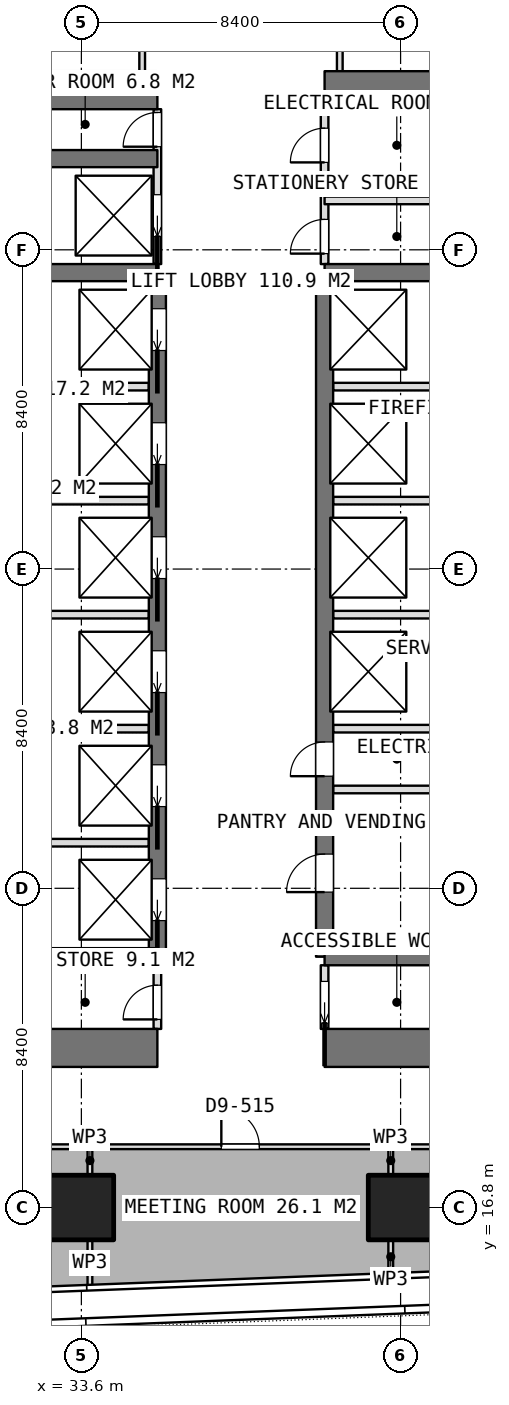
"""IFC4 building model, lengths in metres.
Left out: names, types, materials, properties, quantities, classifications, styles, units other than length and angle.
Written with IfcOpenShell. Run it as: python <this file> out.ifc"""

import sys

from ifc_helpers import new_model, si_unit, direction, frame, frame_2d, origin, origin_2d, place, context, subcontext, project, spatial, rectangle, extrude, element, fill, save


model = new_model("IFC4")
c1 = context("Model", 3, precision=1e-05, world=origin(), true_north=direction((0.0, 1.0)))
c2 = subcontext(c1, "Body", "Model", "MODEL_VIEW")
j1 = project(units=[si_unit("LENGTHUNIT", "METRE"), si_unit("PLANEANGLEUNIT", "RADIAN")], contexts=[c1])
p1 = place(None, origin())
s1 = spatial("IfcSite", under=j1, at=p1, CompositionType="ELEMENT")
p2 = place(p1, origin())
s2 = spatial("IfcBuilding", under=s1, at=p2, CompositionType="ELEMENT")
p3 = place(p2, frame((0.0, 0.0, 132.8)))
s3 = spatial("IfcBuildingStorey", under=s2, at=p3, CompositionType="ELEMENT", Elevation=132.8)
p4 = place(p3, frame((25.2, 21.0, 0.0), z_axis=(0.0, 0.0, 1.0), x_axis=(1.0, 0.0, 0.0)))
e1 = element("IfcWall", 1, at=p4, inside=s3, PredefinedType="SHEAR", context=c2, shape_type="SweptSolid", body=[
    extrude(rectangle(XDim=10.4, YDim=1.0, at=frame_2d((5.2, 0.0))), origin(), (0.0, 0.0, 1.0), 3.75),
])
p5 = place(p3, frame((40.0, 21.0, 0.0), z_axis=(0.0, 0.0, 1.0), x_axis=(1.0, 0.0, 0.0)))
e2 = element("IfcWall", 2, at=p5, inside=s3, PredefinedType="SHEAR", context=c2, shape_type="SweptSolid", body=[
    extrude(rectangle(XDim=10.4, YDim=1.0, at=frame_2d((5.2, 0.0))), origin(), (0.0, 0.0, 1.0), 3.75),
])
p6 = place(p3, frame((25.2, 46.2, 0.0), z_axis=(0.0, 0.0, 1.0), x_axis=(1.0, 0.0, 0.0)))
e3 = element("IfcWall", 3, at=p6, inside=s3, PredefinedType="SHEAR", context=c2, shape_type="SweptSolid", body=[
    extrude(rectangle(XDim=10.4, YDim=1.0, at=frame_2d((5.2, 0.0))), origin(), (0.0, 0.0, 1.0), 3.75),
])
p7 = place(p3, frame((40.0, 46.2, 0.0), z_axis=(0.0, 0.0, 1.0), x_axis=(1.0, 0.0, 0.0)))
e4 = element("IfcWall", 4, at=p7, inside=s3, PredefinedType="SHEAR", context=c2, shape_type="SweptSolid", body=[
    extrude(rectangle(XDim=10.4, YDim=1.0, at=frame_2d((5.2, 0.0))), origin(), (0.0, 0.0, 1.0), 3.75),
])
p8 = place(p3, frame((35.6, 23.4, 0.0), z_axis=(0.0, 0.0, 1.0), x_axis=(0.0, 1.0, 0.0)))
e5 = element("IfcWall", 5, at=p8, inside=s3, PredefinedType="SHEAR", context=c2, shape_type="SweptSolid", body=[
    extrude(rectangle(XDim=18.0, YDim=0.45, at=frame_2d((9.0, 0.0))), origin(), (0.0, 0.0, 1.0), 3.75),
])
p9 = place(p8, frame((0.95, 0.0, 0.0)))
e6 = element("IfcOpeningElement", 6, at=p9, cuts=e5, PredefinedType="OPENING", context=c2, shape_type="SweptSolid", body=[
    extrude(rectangle(XDim=1.1, YDim=2.1, at=frame_2d((0.55, 1.05))), frame((0.0, 0.235, 0.0), z_axis=(0.0, -1.0, 0.0), x_axis=(1.0, 0.0, 0.0)), (0.0, 0.0, 1.0), 0.47),
])
p10 = place(p8, frame((3.95, 0.0, 0.0)))
e7 = element("IfcOpeningElement", 7, at=p10, cuts=e5, PredefinedType="OPENING", context=c2, shape_type="SweptSolid", body=[
    extrude(rectangle(XDim=1.1, YDim=2.1, at=frame_2d((0.55, 1.05))), frame((0.0, 0.235, 0.0), z_axis=(0.0, -1.0, 0.0), x_axis=(1.0, 0.0, 0.0)), (0.0, 0.0, 1.0), 0.47),
])
p11 = place(p8, frame((6.95, 0.0, 0.0)))
e8 = element("IfcOpeningElement", 8, at=p11, cuts=e5, PredefinedType="OPENING", context=c2, shape_type="SweptSolid", body=[
    extrude(rectangle(XDim=1.1, YDim=2.1, at=frame_2d((0.55, 1.05))), frame((0.0, 0.235, 0.0), z_axis=(0.0, -1.0, 0.0), x_axis=(1.0, 0.0, 0.0)), (0.0, 0.0, 1.0), 0.47),
])
p12 = place(p8, frame((9.95, 0.0, 0.0)))
e9 = element("IfcOpeningElement", 9, at=p12, cuts=e5, PredefinedType="OPENING", context=c2, shape_type="SweptSolid", body=[
    extrude(rectangle(XDim=1.1, YDim=2.1, at=frame_2d((0.55, 1.05))), frame((0.0, 0.235, 0.0), z_axis=(0.0, -1.0, 0.0), x_axis=(1.0, 0.0, 0.0)), (0.0, 0.0, 1.0), 0.47),
])
p13 = place(p8, frame((12.95, 0.0, 0.0)))
e10 = element("IfcOpeningElement", 10, at=p13, cuts=e5, PredefinedType="OPENING", context=c2, shape_type="SweptSolid", body=[
    extrude(rectangle(XDim=1.1, YDim=2.1, at=frame_2d((0.55, 1.05))), frame((0.0, 0.235, 0.0), z_axis=(0.0, -1.0, 0.0), x_axis=(1.0, 0.0, 0.0)), (0.0, 0.0, 1.0), 0.47),
])
p14 = place(p8, frame((15.95, 0.0, 0.0)))
e11 = element("IfcOpeningElement", 11, at=p14, cuts=e5, PredefinedType="OPENING", context=c2, shape_type="SweptSolid", body=[
    extrude(rectangle(XDim=1.1, YDim=2.1, at=frame_2d((0.55, 1.05))), frame((0.0, 0.235, 0.0), z_axis=(0.0, -1.0, 0.0), x_axis=(1.0, 0.0, 0.0)), (0.0, 0.0, 1.0), 0.47),
])
p15 = place(p3, frame((40.0, 23.4, 0.0), z_axis=(0.0, 0.0, 1.0), x_axis=(0.0, 1.0, 0.0)))
e12 = element("IfcWall", 12, at=p15, inside=s3, PredefinedType="SHEAR", context=c2, shape_type="SweptSolid", body=[
    extrude(rectangle(XDim=18.0, YDim=0.45, at=frame_2d((9.0, 0.0))), origin(), (0.0, 0.0, 1.0), 3.75),
])
p16 = place(p15, frame((1.7, 0.0, 0.0)))
e13 = element("IfcOpeningElement", 13, at=p16, cuts=e12, PredefinedType="OPENING", context=c2, shape_type="SweptSolid", body=[
    extrude(rectangle(XDim=1.0, YDim=2.1, at=frame_2d((0.5, 1.05))), frame((0.0, 0.235, 0.0), z_axis=(0.0, -1.0, 0.0), x_axis=(1.0, 0.0, 0.0)), (0.0, 0.0, 1.0), 0.47),
])
p17 = place(p15, frame((4.75, 0.0, 0.0)))
e14 = element("IfcOpeningElement", 14, at=p17, cuts=e12, PredefinedType="OPENING", context=c2, shape_type="SweptSolid", body=[
    extrude(rectangle(XDim=0.9, YDim=2.1, at=frame_2d((0.45, 1.05))), frame((0.0, 0.235, 0.0), z_axis=(0.0, -1.0, 0.0), x_axis=(1.0, 0.0, 0.0)), (0.0, 0.0, 1.0), 0.47),
])
for number, where, z_axis, x_axis in (
    (15, (31.8, 23.4, 0.0), (0.0, 0.0, 1.0), (1.0, 0.0, 0.0)),
    (16, (31.8, 41.4, 0.0), (0.0, 0.0, 1.0), (1.0, 0.0, 0.0)),
    (17, (31.8, 44.4, 0.0), (0.0, 0.0, 1.0), (1.0, 0.0, 0.0)),
    (18, (40.0, 23.4, 0.0), (0.0, 0.0, 1.0), (1.0, 0.0, 0.0)),
    (19, (40.0, 41.4, 0.0), (0.0, 0.0, 1.0), (1.0, 0.0, 0.0)),
):
    element("IfcWall", number, at=place(p3, frame(where, z_axis=z_axis, x_axis=x_axis)), inside=s3, PredefinedType="SHEAR", context=c2, shape_type="SweptSolid", body=[
        extrude(rectangle(XDim=3.8, YDim=0.45, at=frame_2d((1.9, 0.0))), origin(), (0.0, 0.0, 1.0), 3.75),
    ])
for number, where, z_axis, x_axis in (
    (20, (33.6, 16.8, 0.0), (0.0, 0.0, 1.0), (1.0, 0.0, 0.0)),
    (21, (42.0, 16.8, 0.0), (0.0, 0.0, 1.0), (1.0, 0.0, 0.0)),
):
    element("IfcColumn", number, at=place(p3, frame(where, z_axis=z_axis, x_axis=x_axis)), inside=s3, PredefinedType="COLUMN", context=c2, shape_type="SweptSolid", body=[
        extrude(rectangle(XDim=1.7, YDim=1.7, at=origin_2d()), origin(), (0.0, 0.0, 1.0), 3.75),
    ])
for number, where, z_axis, x_axis in (
    (22, (32.025, 26.4, 0.0), (0.0, 0.0, 1.0), (1.0, 0.0, 0.0)),
    (23, (32.025, 29.4, 0.0), (0.0, 0.0, 1.0), (1.0, 0.0, 0.0)),
    (24, (32.025, 32.4, 0.0), (0.0, 0.0, 1.0), (1.0, 0.0, 0.0)),
    (25, (32.025, 35.4, 0.0), (0.0, 0.0, 1.0), (1.0, 0.0, 0.0)),
    (26, (32.025, 38.4, 0.0), (0.0, 0.0, 1.0), (1.0, 0.0, 0.0)),
):
    element("IfcWall", number, at=place(p3, frame(where, z_axis=z_axis, x_axis=x_axis)), inside=s3, PredefinedType="PARTITIONING", context=c2, shape_type="SweptSolid", body=[
        extrude(rectangle(XDim=3.35, YDim=0.2, at=frame_2d((1.675, 0.0))), origin(), (0.0, 0.0, 1.0), 3.5),
    ])
for number, where, z_axis, x_axis in (
    (27, (40.225, 29.4, 0.0), (0.0, 0.0, 1.0), (1.0, 0.0, 0.0)),
    (28, (40.225, 32.4, 0.0), (0.0, 0.0, 1.0), (1.0, 0.0, 0.0)),
    (29, (40.225, 35.4, 0.0), (0.0, 0.0, 1.0), (1.0, 0.0, 0.0)),
    (30, (40.225, 38.4, 0.0), (0.0, 0.0, 1.0), (1.0, 0.0, 0.0)),
):
    element("IfcWall", number, at=place(p3, frame(where, z_axis=z_axis, x_axis=x_axis)), inside=s3, PredefinedType="PARTITIONING", context=c2, shape_type="SweptSolid", body=[
        extrude(rectangle(XDim=3.35, YDim=0.2, at=frame_2d((1.675, 0.0))), origin(), (0.0, 0.0, 1.0), 3.5),
    ])
p18 = place(p3, frame((40.0, 21.5, 0.0), z_axis=(0.0, 0.0, 1.0), x_axis=(0.0, 1.0, 0.0)))
e31 = element("IfcWall", 31, at=p18, inside=s3, PredefinedType="PARTITIONING", context=c2, shape_type="SweptSolid", body=[
    extrude(rectangle(XDim=1.675, YDim=0.2, at=frame_2d((0.837, 0.0))), origin(), (0.0, 0.0, 1.0), 3.5),
])
p19 = place(p18, frame((0.15, 0.0, 0.0)))
e32 = element("IfcOpeningElement", 32, at=p19, cuts=e31, PredefinedType="OPENING", context=c2, shape_type="SweptSolid", body=[
    extrude(rectangle(XDim=1.1, YDim=2.1, at=frame_2d((0.55, 1.05))), frame((0.0, 0.11, 0.0), z_axis=(0.0, -1.0, 0.0), x_axis=(1.0, 0.0, 0.0)), (0.0, 0.0, 1.0), 0.22),
])
p20 = place(p3, frame((40.0, 41.625, 0.0), z_axis=(0.0, 0.0, 1.0), x_axis=(0.0, 1.0, 0.0)))
e33 = element("IfcWall", 33, at=p20, inside=s3, PredefinedType="PARTITIONING", context=c2, shape_type="SweptSolid", body=[
    extrude(rectangle(XDim=4.075, YDim=0.2, at=frame_2d((2.038, 0.0))), origin(), (0.0, 0.0, 1.0), 3.5),
])
p21 = place(p20, frame((2.675, 0.0, 0.0)))
e34 = element("IfcOpeningElement", 34, at=p21, cuts=e33, PredefinedType="OPENING", context=c2, shape_type="SweptSolid", body=[
    extrude(rectangle(XDim=0.9, YDim=2.1, at=frame_2d((0.45, 1.05))), frame((0.0, 0.11, 0.0), z_axis=(0.0, -1.0, 0.0), x_axis=(1.0, 0.0, 0.0)), (0.0, 0.0, 1.0), 0.22),
])
p22 = place(p20, frame((0.275, 0.0, 0.0)))
e35 = element("IfcOpeningElement", 35, at=p22, cuts=e33, PredefinedType="OPENING", context=c2, shape_type="SweptSolid", body=[
    extrude(rectangle(XDim=0.9, YDim=2.1, at=frame_2d((0.45, 1.05))), frame((0.0, 0.11, 0.0), z_axis=(0.0, -1.0, 0.0), x_axis=(1.0, 0.0, 0.0)), (0.0, 0.0, 1.0), 0.22),
])
p23 = place(p3, frame((35.6, 41.625, 0.0), z_axis=(0.0, 0.0, 1.0), x_axis=(0.0, 1.0, 0.0)))
e36 = element("IfcWall", 36, at=p23, inside=s3, PredefinedType="PARTITIONING", context=c2, shape_type="SweptSolid", body=[
    extrude(rectangle(XDim=4.075, YDim=0.2, at=frame_2d((2.038, 0.0))), origin(), (0.0, 0.0, 1.0), 3.5),
])
p24 = place(p23, frame((3.088, 0.0, 0.0)))
e37 = element("IfcOpeningElement", 37, at=p24, cuts=e36, PredefinedType="OPENING", context=c2, shape_type="SweptSolid", body=[
    extrude(rectangle(XDim=0.9, YDim=2.1, at=frame_2d((0.45, 1.05))), frame((0.0, 0.11, 0.0), z_axis=(0.0, -1.0, 0.0), x_axis=(1.0, 0.0, 0.0)), (0.0, 0.0, 1.0), 0.22),
])
p25 = place(p23, frame((0.725, 0.0, 0.0)))
e38 = element("IfcOpeningElement", 38, at=p25, cuts=e36, PredefinedType="OPENING", context=c2, shape_type="SweptSolid", body=[
    extrude(rectangle(XDim=1.1, YDim=2.1, at=frame_2d((0.55, 1.05))), frame((0.0, 0.11, 0.0), z_axis=(0.0, -1.0, 0.0), x_axis=(1.0, 0.0, 0.0)), (0.0, 0.0, 1.0), 0.22),
])
p26 = place(p3, frame((35.6, 21.5, 0.0), z_axis=(0.0, 0.0, 1.0), x_axis=(0.0, 1.0, 0.0)))
e39 = element("IfcWall", 39, at=p26, inside=s3, PredefinedType="PARTITIONING", context=c2, shape_type="SweptSolid", body=[
    extrude(rectangle(XDim=1.675, YDim=0.2, at=frame_2d((0.837, 0.0))), origin(), (0.0, 0.0, 1.0), 3.5),
])
p27 = place(p26, frame((0.25, 0.0, 0.0)))
e40 = element("IfcOpeningElement", 40, at=p27, cuts=e39, PredefinedType="OPENING", context=c2, shape_type="SweptSolid", body=[
    extrude(rectangle(XDim=0.9, YDim=2.1, at=frame_2d((0.45, 1.05))), frame((0.0, 0.11, 0.0), z_axis=(0.0, -1.0, 0.0), x_axis=(1.0, 0.0, 0.0)), (0.0, 0.0, 1.0), 0.22),
])
p28 = place(p3, frame((40.225, 27.8, 0.0), z_axis=(0.0, 0.0, 1.0), x_axis=(1.0, 0.0, 0.0)))
e41 = element("IfcWall", 41, at=p28, inside=s3, PredefinedType="PARTITIONING", context=c2, shape_type="SweptSolid", body=[
    extrude(rectangle(XDim=3.35, YDim=0.2, at=frame_2d((1.675, 0.0))), origin(), (0.0, 0.0, 1.0), 3.5),
])
p29 = place(p3, frame((40.0, 43.3, 0.0), z_axis=(0.0, 0.0, 1.0), x_axis=(1.0, 0.0, 0.0)))
e42 = element("IfcWall", 42, at=p29, inside=s3, PredefinedType="PARTITIONING", context=c2, shape_type="SweptSolid", body=[
    extrude(rectangle(XDim=3.575, YDim=0.2, at=frame_2d((1.788, 0.0))), origin(), (0.0, 0.0, 1.0), 3.5),
])
for number, where, z_axis, x_axis in (
    (43, (40.4, 46.7, 0.0), (0.0, 0.0, 1.0), (0.0, 1.0, 0.0)),
    (44, (35.2, 46.7, 0.0), (0.0, 0.0, 1.0), (0.0, 1.0, 0.0)),
):
    element("IfcWall", number, at=place(p3, frame(where, z_axis=z_axis, x_axis=x_axis)), inside=s3, PredefinedType="PARTITIONING", context=c2, shape_type="SweptSolid", body=[
        extrude(rectangle(XDim=2.625, YDim=0.15, at=frame_2d((1.312, 0.0))), origin(), (0.0, 0.0, 1.0), 3.5),
    ])
p30 = place(p3, frame((41.741, 18.4, 0.0), z_axis=(0.0, 0.0, 1.0), x_axis=(1.0, 0.0, 0.0)))
e45 = element("IfcWall", 45, at=p30, inside=s3, PredefinedType="PARTITIONING", context=c2, shape_type="SweptSolid", body=[
    extrude(rectangle(XDim=8.195, YDim=0.125, at=frame_2d((4.098, 0.0))), origin(), (0.0, 0.0, 1.0), 3.5),
])
p31 = place(p30, frame((3.597, 0.0, 0.0)))
e46 = element("IfcOpeningElement", 46, at=p31, cuts=e45, PredefinedType="OPENING", context=c2, shape_type="SweptSolid", body=[
    extrude(rectangle(XDim=1.0, YDim=2.1, at=frame_2d((0.5, 1.05))), frame((0.0, 0.073, 0.0), z_axis=(0.0, -1.0, 0.0), x_axis=(1.0, 0.0, 0.0)), (0.0, 0.0, 1.0), 0.145),
])
p32 = place(p3, frame((41.741, 15.08, 0.0), z_axis=(0.0, 0.0, 1.0), x_axis=(0.0, 1.0, 0.0)))
e47 = element("IfcWall", 47, at=p32, inside=s3, PredefinedType="PARTITIONING", context=c2, shape_type="SweptSolid", body=[
    extrude(rectangle(XDim=0.85, YDim=0.125, at=frame_2d((0.425, 0.0))), origin(), (0.0, 0.0, 1.0), 3.5),
])
p33 = place(p3, frame((41.741, 17.67, 0.0), z_axis=(0.0, 0.0, 1.0), x_axis=(0.0, 1.0, 0.0)))
e48 = element("IfcWall", 48, at=p33, inside=s3, PredefinedType="PARTITIONING", context=c2, shape_type="SweptSolid", body=[
    extrude(rectangle(XDim=0.73, YDim=0.125, at=frame_2d((0.365, 0.0))), origin(), (0.0, 0.0, 1.0), 3.5),
])
p34 = place(p3, frame((25.38, 18.4, 0.0), z_axis=(0.0, 0.0, 1.0), x_axis=(1.0, 0.0, 0.0)))
e49 = element("IfcWall", 49, at=p34, inside=s3, PredefinedType="PARTITIONING", context=c2, shape_type="SweptSolid", body=[
    extrude(rectangle(XDim=8.445, YDim=0.125, at=frame_2d((4.223, 0.0))), origin(), (0.0, 0.0, 1.0), 3.5),
])
p35 = place(p34, frame((3.723, 0.0, 0.0)))
e50 = element("IfcOpeningElement", 50, at=p35, cuts=e49, PredefinedType="OPENING", context=c2, shape_type="SweptSolid", body=[
    extrude(rectangle(XDim=1.0, YDim=2.1, at=frame_2d((0.5, 1.05))), frame((0.0, 0.073, 0.0), z_axis=(0.0, -1.0, 0.0), x_axis=(1.0, 0.0, 0.0)), (0.0, 0.0, 1.0), 0.145),
])
p36 = place(p3, frame((33.825, 18.4, 0.0), z_axis=(0.0, 0.0, 1.0), x_axis=(0.0, -1.0, 0.0)))
e51 = element("IfcWall", 51, at=p36, inside=s3, PredefinedType="PARTITIONING", context=c2, shape_type="SweptSolid", body=[
    extrude(rectangle(XDim=0.73, YDim=0.125, at=frame_2d((0.365, 0.0))), origin(), (0.0, 0.0, 1.0), 3.5),
])
p37 = place(p3, frame((33.825, 15.93, 0.0), z_axis=(0.0, 0.0, 1.0), x_axis=(0.0, -1.0, 0.0)))
e52 = element("IfcWall", 52, at=p37, inside=s3, PredefinedType="PARTITIONING", context=c2, shape_type="SweptSolid", body=[
    extrude(rectangle(XDim=1.188, YDim=0.125, at=frame_2d((0.594, 0.0))), origin(), (0.0, 0.0, 1.0), 3.5),
])
p38 = place(p3, frame((33.826, 18.4, 0.0), z_axis=(0.0, 0.0, 1.0), x_axis=(1.0, 0.0, 0.0)))
e53 = element("IfcWall", 53, at=p38, inside=s3, PredefinedType="PARTITIONING", context=c2, shape_type="SweptSolid", body=[
    extrude(rectangle(XDim=7.914, YDim=0.125, at=frame_2d((3.957, 0.0))), origin(), (0.0, 0.0, 1.0), 3.5),
])
p39 = place(p38, frame((3.457, 0.0, 0.0)))
e54 = element("IfcOpeningElement", 54, at=p39, cuts=e53, PredefinedType="OPENING", context=c2, shape_type="SweptSolid", body=[
    extrude(rectangle(XDim=1.0, YDim=2.1, at=frame_2d((0.5, 1.05))), frame((0.0, 0.073, 0.0), z_axis=(0.0, -1.0, 0.0), x_axis=(1.0, 0.0, 0.0)), (0.0, 0.0, 1.0), 0.145),
])
p40 = place(p19, origin())
e55 = element("IfcDoor", 55, at=p40, inside=s3, OperationType="SLIDING_TO_LEFT", PredefinedType="DOOR", context=c2, shape_type="SweptSolid", body=[
    extrude(rectangle(XDim=1.1, YDim=2.1, at=frame_2d((0.55, 1.05))), frame((0.0, 0.025, 0.0), z_axis=(0.0, -1.0, 0.0), x_axis=(1.0, 0.0, 0.0)), (0.0, 0.0, 1.0), 0.05),
])
fill(e32, e55)
p41 = place(p27, origin())
e56 = element("IfcDoor", 56, at=p41, inside=s3, OperationType="SINGLE_SWING_LEFT", PredefinedType="DOOR", context=c2, shape_type="SweptSolid", body=[
    extrude(rectangle(XDim=0.9, YDim=2.1, at=frame_2d((0.45, 1.05))), frame((0.0, 0.025, 0.0), z_axis=(0.0, -1.0, 0.0), x_axis=(1.0, 0.0, 0.0)), (0.0, 0.0, 1.0), 0.05),
])
fill(e40, e56)
p42 = place(p21, origin())
e57 = element("IfcDoor", 57, at=p42, inside=s3, OperationType="SINGLE_SWING_LEFT", PredefinedType="DOOR", context=c2, shape_type="SweptSolid", body=[
    extrude(rectangle(XDim=0.9, YDim=2.1, at=frame_2d((0.45, 1.05))), frame((0.0, 0.025, 0.0), z_axis=(0.0, -1.0, 0.0), x_axis=(1.0, 0.0, 0.0)), (0.0, 0.0, 1.0), 0.05),
])
fill(e34, e57)
p43 = place(p22, origin())
e58 = element("IfcDoor", 58, at=p43, inside=s3, OperationType="SINGLE_SWING_LEFT", PredefinedType="DOOR", context=c2, shape_type="SweptSolid", body=[
    extrude(rectangle(XDim=0.9, YDim=2.1, at=frame_2d((0.45, 1.05))), frame((0.0, 0.025, 0.0), z_axis=(0.0, -1.0, 0.0), x_axis=(1.0, 0.0, 0.0)), (0.0, 0.0, 1.0), 0.05),
])
fill(e35, e58)
p44 = place(p16, origin())
e59 = element("IfcDoor", 59, at=p44, inside=s3, OperationType="SINGLE_SWING_LEFT", PredefinedType="DOOR", context=c2, shape_type="SweptSolid", body=[
    extrude(rectangle(XDim=1.0, YDim=2.1, at=frame_2d((0.5, 1.05))), frame((0.0, 0.025, 0.0), z_axis=(0.0, -1.0, 0.0), x_axis=(1.0, 0.0, 0.0)), (0.0, 0.0, 1.0), 0.05),
])
fill(e13, e59)
p45 = place(p17, origin())
e60 = element("IfcDoor", 60, at=p45, inside=s3, OperationType="SINGLE_SWING_LEFT", PredefinedType="DOOR", context=c2, shape_type="SweptSolid", body=[
    extrude(rectangle(XDim=0.9, YDim=2.1, at=frame_2d((0.45, 1.05))), frame((0.0, 0.025, 0.0), z_axis=(0.0, -1.0, 0.0), x_axis=(1.0, 0.0, 0.0)), (0.0, 0.0, 1.0), 0.05),
])
fill(e14, e60)
p46 = place(p24, origin())
e61 = element("IfcDoor", 61, at=p46, inside=s3, OperationType="SINGLE_SWING_LEFT", PredefinedType="DOOR", context=c2, shape_type="SweptSolid", body=[
    extrude(rectangle(XDim=0.9, YDim=2.1, at=frame_2d((0.45, 1.05))), frame((0.0, 0.025, 0.0), z_axis=(0.0, -1.0, 0.0), x_axis=(1.0, 0.0, 0.0)), (0.0, 0.0, 1.0), 0.05),
])
fill(e37, e61)
p47 = place(p9, origin())
e62 = element("IfcDoor", 62, at=p47, inside=s3, OperationType="SLIDING_TO_LEFT", PredefinedType="USERDEFINED", context=c2, shape_type="SweptSolid", body=[
    extrude(rectangle(XDim=1.1, YDim=2.1, at=frame_2d((0.55, 1.05))), frame((0.0, 0.025, 0.0), z_axis=(0.0, -1.0, 0.0), x_axis=(1.0, 0.0, 0.0)), (0.0, 0.0, 1.0), 0.05),
])
fill(e6, e62)
p48 = place(p10, origin())
e63 = element("IfcDoor", 63, at=p48, inside=s3, OperationType="SLIDING_TO_LEFT", PredefinedType="USERDEFINED", context=c2, shape_type="SweptSolid", body=[
    extrude(rectangle(XDim=1.1, YDim=2.1, at=frame_2d((0.55, 1.05))), frame((0.0, 0.025, 0.0), z_axis=(0.0, -1.0, 0.0), x_axis=(1.0, 0.0, 0.0)), (0.0, 0.0, 1.0), 0.05),
])
fill(e7, e63)
p49 = place(p11, origin())
e64 = element("IfcDoor", 64, at=p49, inside=s3, OperationType="SLIDING_TO_LEFT", PredefinedType="USERDEFINED", context=c2, shape_type="SweptSolid", body=[
    extrude(rectangle(XDim=1.1, YDim=2.1, at=frame_2d((0.55, 1.05))), frame((0.0, 0.025, 0.0), z_axis=(0.0, -1.0, 0.0), x_axis=(1.0, 0.0, 0.0)), (0.0, 0.0, 1.0), 0.05),
])
fill(e8, e64)
p50 = place(p12, origin())
e65 = element("IfcDoor", 65, at=p50, inside=s3, OperationType="SLIDING_TO_LEFT", PredefinedType="USERDEFINED", context=c2, shape_type="SweptSolid", body=[
    extrude(rectangle(XDim=1.1, YDim=2.1, at=frame_2d((0.55, 1.05))), frame((0.0, 0.025, 0.0), z_axis=(0.0, -1.0, 0.0), x_axis=(1.0, 0.0, 0.0)), (0.0, 0.0, 1.0), 0.05),
])
fill(e9, e65)
p51 = place(p13, origin())
e66 = element("IfcDoor", 66, at=p51, inside=s3, OperationType="SLIDING_TO_LEFT", PredefinedType="USERDEFINED", context=c2, shape_type="SweptSolid", body=[
    extrude(rectangle(XDim=1.1, YDim=2.1, at=frame_2d((0.55, 1.05))), frame((0.0, 0.025, 0.0), z_axis=(0.0, -1.0, 0.0), x_axis=(1.0, 0.0, 0.0)), (0.0, 0.0, 1.0), 0.05),
])
fill(e10, e66)
p52 = place(p14, origin())
e67 = element("IfcDoor", 67, at=p52, inside=s3, OperationType="SLIDING_TO_LEFT", PredefinedType="USERDEFINED", context=c2, shape_type="SweptSolid", body=[
    extrude(rectangle(XDim=1.1, YDim=2.1, at=frame_2d((0.55, 1.05))), frame((0.0, 0.025, 0.0), z_axis=(0.0, -1.0, 0.0), x_axis=(1.0, 0.0, 0.0)), (0.0, 0.0, 1.0), 0.05),
])
fill(e11, e67)
p53 = place(p25, origin())
e68 = element("IfcDoor", 68, at=p53, inside=s3, OperationType="SLIDING_TO_LEFT", PredefinedType="USERDEFINED", context=c2, shape_type="SweptSolid", body=[
    extrude(rectangle(XDim=1.1, YDim=2.1, at=frame_2d((0.55, 1.05))), frame((0.0, 0.025, 0.0), z_axis=(0.0, -1.0, 0.0), x_axis=(1.0, 0.0, 0.0)), (0.0, 0.0, 1.0), 0.05),
])
fill(e38, e68)
p54 = place(p39, origin())
e69 = element("IfcDoor", 69, at=p54, inside=s3, OperationType="SINGLE_SWING_LEFT", PredefinedType="DOOR", context=c2, shape_type="SweptSolid", body=[
    extrude(rectangle(XDim=1.0, YDim=2.1, at=frame_2d((0.5, 1.05))), frame((0.0, 0.025, 0.0), z_axis=(0.0, -1.0, 0.0), x_axis=(1.0, 0.0, 0.0)), (0.0, 0.0, 1.0), 0.05),
])
fill(e54, e69)
save(model, sys.argv[1])
